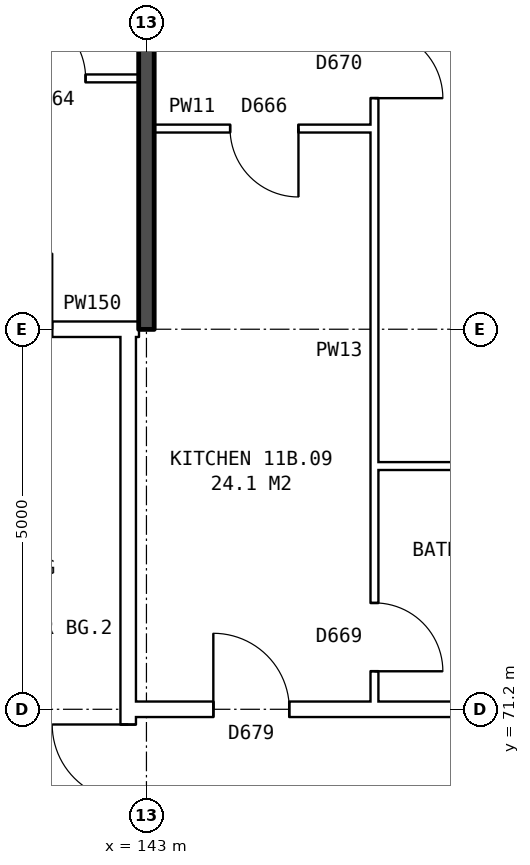
"""IFC4 building model, lengths in metres.
Left out: names, types, materials, properties, quantities, classifications, styles, units other than length and angle.
Written with IfcOpenShell. Run it as: python <this file> out.ifc"""

import sys

from ifc_helpers import new_model, si_unit, direction, frame, frame_2d, origin, place, context, subcontext, project, spatial, rectangle, extrude, element, fill, save


model = new_model("IFC4")
c1 = context("Model", 3, precision=1e-05, world=origin(), true_north=direction((0.0, 1.0)))
c2 = subcontext(c1, "Body", "Model", "MODEL_VIEW")
j1 = project(units=[si_unit("LENGTHUNIT", "METRE"), si_unit("PLANEANGLEUNIT", "RADIAN")], contexts=[c1])
p1 = place(None, origin())
s1 = spatial("IfcSite", under=j1, at=p1, CompositionType="ELEMENT")
p2 = place(p1, origin())
s2 = spatial("IfcBuilding", under=s1, at=p2, CompositionType="ELEMENT")
p3 = place(p2, frame((0.0, 0.0, 44.3)))
s3 = spatial("IfcBuildingStorey", under=s2, at=p3, CompositionType="ELEMENT", Elevation=44.3)
p4 = place(p3, frame((142.76, 63.9, 0.0), z_axis=(0.0, 0.0, 1.0), x_axis=(0.0, 1.0, 0.0)))
e1 = element("IfcWall", 1, at=p4, inside=s3, PredefinedType="PARTITIONING", context=c2, shape_type="SweptSolid", body=[
    extrude(rectangle(XDim=12.2, YDim=0.2, at=frame_2d((6.1, 0.0))), origin(), (0.0, 0.0, 1.0), 2.85),
])
p5 = place(p4, frame((5.1, 0.0, 0.0)))
e2 = element("IfcOpeningElement", 2, at=p5, cuts=e1, PredefinedType="OPENING", context=c2, shape_type="SweptSolid", body=[
    extrude(rectangle(XDim=2.0, YDim=2.1, at=frame_2d((1.0, 1.05))), frame((0.0, 0.11, 0.0), z_axis=(0.0, -1.0, 0.0), x_axis=(1.0, 0.0, 0.0)), (0.0, 0.0, 1.0), 0.22),
])
p6 = place(p3, frame((142.76, 71.2, 0.0), z_axis=(0.0, 0.0, 1.0), x_axis=(1.0, 0.0, 0.0)))
e3 = element("IfcWall", 3, at=p6, inside=s3, PredefinedType="PARTITIONING", context=c2, shape_type="SweptSolid", body=[
    extrude(rectangle(XDim=14.48, YDim=0.2, at=frame_2d((7.24, 0.0))), origin(), (0.0, 0.0, 1.0), 2.85),
])
p7 = place(p6, frame((1.12, 0.0, 0.0)))
e4 = element("IfcOpeningElement", 4, at=p7, cuts=e3, PredefinedType="OPENING", context=c2, shape_type="SweptSolid", body=[
    extrude(rectangle(XDim=1.0, YDim=2.1, at=frame_2d((0.5, 1.05))), frame((0.0, 0.11, 0.0), z_axis=(0.0, -1.0, 0.0), x_axis=(1.0, 0.0, 0.0)), (0.0, 0.0, 1.0), 0.22),
])
p8 = place(p6, frame((7.24, 0.0, 0.0)))
e5 = element("IfcOpeningElement", 5, at=p8, cuts=e3, PredefinedType="OPENING", context=c2, shape_type="SweptSolid", body=[
    extrude(rectangle(XDim=1.0, YDim=2.1, at=frame_2d((0.5, 1.05))), frame((0.0, 0.11, 0.0), z_axis=(0.0, -1.0, 0.0), x_axis=(1.0, 0.0, 0.0)), (0.0, 0.0, 1.0), 0.22),
])
p9 = place(p3, frame((146.0, 74.4, 0.0), z_axis=(0.0, 0.0, 1.0), x_axis=(1.0, 0.0, 0.0)))
e6 = element("IfcWall", 6, at=p9, inside=s3, PredefinedType="PARTITIONING", context=c2, shape_type="SweptSolid", body=[
    extrude(rectangle(XDim=2.9, YDim=0.1, at=frame_2d((1.45, 0.0))), origin(), (0.0, 0.0, 1.0), 2.85),
])
p10 = place(p3, frame((139.76, 76.2, 0.0), z_axis=(0.0, 0.0, 1.0), x_axis=(1.0, 0.0, 0.0)))
e7 = element("IfcWall", 7, at=p10, inside=s3, PredefinedType="PARTITIONING", context=c2, shape_type="SweptSolid", body=[
    extrude(rectangle(XDim=3.0, YDim=0.2, at=frame_2d((1.5, 0.0))), origin(), (0.0, 0.0, 1.0), 2.85),
])
p11 = place(p10, frame((1.0, 0.0, 0.0)))
e8 = element("IfcOpeningElement", 8, at=p11, cuts=e7, PredefinedType="OPENING", context=c2, shape_type="SweptSolid", body=[
    extrude(rectangle(XDim=1.0, YDim=2.1, at=frame_2d((0.5, 1.05))), frame((0.0, 0.11, 0.0), z_axis=(0.0, -1.0, 0.0), x_axis=(1.0, 0.0, 0.0)), (0.0, 0.0, 1.0), 0.22),
])
p12 = place(p3, frame((142.76, 76.2, 0.0), z_axis=(0.0, 0.0, 1.0), x_axis=(1.0, 0.0, 0.0)))
e9 = element("IfcWall", 9, at=p12, inside=s3, PredefinedType="PARTITIONING", context=c2, shape_type="SweptSolid", body=[
    extrude(rectangle(XDim=0.14, YDim=0.2, at=frame_2d((0.07, 0.0))), origin(), (0.0, 0.0, 1.0), 2.85),
])
p13 = place(p3, frame((143.1, 78.84, 0.0), z_axis=(0.0, 0.0, 1.0), x_axis=(1.0, 0.0, 0.0)))
e10 = element("IfcWall", 10, at=p13, inside=s3, PredefinedType="PARTITIONING", context=c2, shape_type="SweptSolid", body=[
    extrude(rectangle(XDim=2.9, YDim=0.1, at=frame_2d((1.45, 0.0))), origin(), (0.0, 0.0, 1.0), 2.85),
])
p14 = place(p13, frame((1.0, 0.0, 0.0)))
e11 = element("IfcOpeningElement", 11, at=p14, cuts=e10, PredefinedType="OPENING", context=c2, shape_type="SweptSolid", body=[
    extrude(rectangle(XDim=0.9, YDim=2.1, at=frame_2d((0.45, 1.05))), frame((0.0, 0.06, 0.0), z_axis=(0.0, -1.0, 0.0), x_axis=(1.0, 0.0, 0.0)), (0.0, 0.0, 1.0), 0.12),
])
p15 = place(p3, frame((137.1, 79.5, 0.0), z_axis=(0.0, 0.0, 1.0), x_axis=(1.0, 0.0, 0.0)))
e12 = element("IfcWall", 12, at=p15, inside=s3, PredefinedType="PARTITIONING", context=c2, shape_type="SweptSolid", body=[
    extrude(rectangle(XDim=5.8, YDim=0.1, at=frame_2d((2.9, 0.0))), origin(), (0.0, 0.0, 1.0), 2.85),
])
p16 = place(p15, frame((1.3, 0.0, 0.0)))
e13 = element("IfcOpeningElement", 13, at=p16, cuts=e12, PredefinedType="OPENING", context=c2, shape_type="SweptSolid", body=[
    extrude(rectangle(XDim=0.9, YDim=2.1, at=frame_2d((0.45, 1.05))), frame((0.0, 0.06, 0.0), z_axis=(0.0, -1.0, 0.0), x_axis=(1.0, 0.0, 0.0)), (0.0, 0.0, 1.0), 0.12),
])
p17 = place(p15, frame((4.2, 0.0, 0.0)))
e14 = element("IfcOpeningElement", 14, at=p17, cuts=e12, PredefinedType="OPENING", context=c2, shape_type="SweptSolid", body=[
    extrude(rectangle(XDim=0.9, YDim=2.1, at=frame_2d((0.45, 1.05))), frame((0.0, 0.06, 0.0), z_axis=(0.0, -1.0, 0.0), x_axis=(1.0, 0.0, 0.0)), (0.0, 0.0, 1.0), 0.12),
])
p18 = place(p3, frame((143.0, 76.2, 0.0), z_axis=(0.0, 0.0, 1.0), x_axis=(0.0, 1.0, 0.0)))
e15 = element("IfcWall", 15, at=p18, inside=s3, PredefinedType="SOLIDWALL", context=c2, shape_type="SweptSolid", body=[
    extrude(rectangle(XDim=9.44, YDim=0.2, at=frame_2d((4.72, 0.0))), origin(), (0.0, 0.0, 1.0), 2.85),
])
p19 = place(p3, frame((146.0, 71.3, 0.0), z_axis=(0.0, 0.0, 1.0), x_axis=(0.0, 1.0, 0.0)))
e16 = element("IfcWall", 16, at=p19, inside=s3, PredefinedType="PARTITIONING", context=c2, shape_type="SweptSolid", body=[
    extrude(rectangle(XDim=14.34, YDim=0.1, at=frame_2d((7.17, 0.0))), origin(), (0.0, 0.0, 1.0), 2.85),
])
p20 = place(p19, frame((7.94, 0.0, 0.0)))
e17 = element("IfcOpeningElement", 17, at=p20, cuts=e16, PredefinedType="OPENING", context=c2, shape_type="SweptSolid", body=[
    extrude(rectangle(XDim=0.9, YDim=2.1, at=frame_2d((0.45, 1.05))), frame((0.0, 0.06, 0.0), z_axis=(0.0, -1.0, 0.0), x_axis=(1.0, 0.0, 0.0)), (0.0, 0.0, 1.0), 0.12),
])
p21 = place(p19, frame((0.4, 0.0, 0.0)))
e18 = element("IfcOpeningElement", 18, at=p21, cuts=e16, PredefinedType="OPENING", context=c2, shape_type="SweptSolid", body=[
    extrude(rectangle(XDim=0.9, YDim=2.1, at=frame_2d((0.45, 1.05))), frame((0.0, 0.06, 0.0), z_axis=(0.0, -1.0, 0.0), x_axis=(1.0, 0.0, 0.0)), (0.0, 0.0, 1.0), 0.12),
])
p22 = place(p5, origin())
e19 = element("IfcDoor", 19, at=p22, inside=s3, OperationType="DOUBLE_DOOR_SINGLE_SWING", PredefinedType="DOOR", context=c2, shape_type="SweptSolid", body=[
    extrude(rectangle(XDim=2.0, YDim=2.1, at=frame_2d((1.0, 1.05))), frame((0.0, 0.025, 0.0), z_axis=(0.0, -1.0, 0.0), x_axis=(1.0, 0.0, 0.0)), (0.0, 0.0, 1.0), 0.05),
])
fill(e2, e19)
p23 = place(p17, origin())
e20 = element("IfcDoor", 20, at=p23, inside=s3, OperationType="SINGLE_SWING_LEFT", PredefinedType="DOOR", context=c2, shape_type="SweptSolid", body=[
    extrude(rectangle(XDim=0.9, YDim=2.1, at=frame_2d((0.45, 1.05))), frame((0.0, 0.025, 0.0), z_axis=(0.0, -1.0, 0.0), x_axis=(1.0, 0.0, 0.0)), (0.0, 0.0, 1.0), 0.05),
])
fill(e14, e20)
p24 = place(p20, frame((0.9, 0.0, 0.0), z_axis=(0.0, 0.0, 1.0), x_axis=(-1.0, 0.0, 0.0)))
e21 = element("IfcDoor", 21, at=p24, inside=s3, OperationType="SINGLE_SWING_RIGHT", PredefinedType="DOOR", context=c2, shape_type="SweptSolid", body=[
    extrude(rectangle(XDim=0.9, YDim=2.1, at=frame_2d((0.45, 1.05))), frame((0.0, 0.025, 0.0), z_axis=(0.0, -1.0, 0.0), x_axis=(1.0, 0.0, 0.0)), (0.0, 0.0, 1.0), 0.05),
])
fill(e17, e21)
p25 = place(p7, origin())
e22 = element("IfcDoor", 22, at=p25, inside=s3, OperationType="SINGLE_SWING_LEFT", PredefinedType="DOOR", context=c2, shape_type="SweptSolid", body=[
    extrude(rectangle(XDim=1.0, YDim=2.1, at=frame_2d((0.5, 1.05))), frame((0.0, 0.025, 0.0), z_axis=(0.0, -1.0, 0.0), x_axis=(1.0, 0.0, 0.0)), (0.0, 0.0, 1.0), 0.05),
])
fill(e4, e22)
p26 = place(p14, frame((0.9, 0.0, 0.0), z_axis=(0.0, 0.0, 1.0), x_axis=(-1.0, 0.0, 0.0)))
e23 = element("IfcDoor", 23, at=p26, inside=s3, OperationType="SINGLE_SWING_LEFT", PredefinedType="DOOR", context=c2, shape_type="SweptSolid", body=[
    extrude(rectangle(XDim=0.9, YDim=2.1, at=frame_2d((0.45, 1.05))), frame((0.0, 0.025, 0.0), z_axis=(0.0, -1.0, 0.0), x_axis=(1.0, 0.0, 0.0)), (0.0, 0.0, 1.0), 0.05),
])
fill(e11, e23)
p27 = place(p21, frame((0.9, 0.0, 0.0), z_axis=(0.0, 0.0, 1.0), x_axis=(-1.0, 0.0, 0.0)))
e24 = element("IfcDoor", 24, at=p27, inside=s3, OperationType="SINGLE_SWING_RIGHT", PredefinedType="DOOR", context=c2, shape_type="SweptSolid", body=[
    extrude(rectangle(XDim=0.9, YDim=2.1, at=frame_2d((0.45, 1.05))), frame((0.0, 0.025, 0.0), z_axis=(0.0, -1.0, 0.0), x_axis=(1.0, 0.0, 0.0)), (0.0, 0.0, 1.0), 0.05),
])
fill(e18, e24)
save(model, sys.argv[1])
